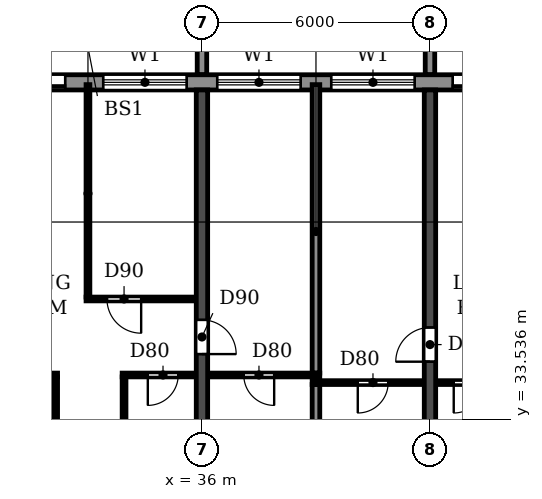
"""IFC4 building model, lengths in metres.
Left out: names, types, materials, properties, quantities, classifications, styles, units other than length and angle.
Written with IfcOpenShell. Run it as: python <this file> out.ifc"""

import sys

from ifc_helpers import new_model, si_unit, direction, frame, frame_2d, origin, place, context, subcontext, project, spatial, polyline, rectangle, outline, extrude, source, transform, mapped, element, fill, save


model = new_model("IFC4")
c1 = context("Model", 3, precision=1e-05, world=origin(), true_north=direction((0.0, 1.0)))
c2 = subcontext(c1, "Body", "Model", "MODEL_VIEW")
j1 = project(units=[si_unit("LENGTHUNIT", "METRE"), si_unit("PLANEANGLEUNIT", "RADIAN")], contexts=[c1])
p1 = place(None, origin())
s1 = spatial("IfcSite", under=j1, at=p1, CompositionType="ELEMENT")
p2 = place(p1, origin())
s2 = spatial("IfcBuilding", under=s1, at=p2, CompositionType="ELEMENT")
p3 = place(p2, frame((0.0, 0.0, 152.1)))
s3 = spatial("IfcBuildingStorey", under=s2, at=p3, CompositionType="ELEMENT", Elevation=152.1)
p4 = place(p3, frame((36.0, 30.525, 0.0), z_axis=(0.0, 0.0, 1.0), x_axis=(0.0, 1.0, 0.0)))
e1 = element("IfcWall", 1, at=p4, inside=s3, PredefinedType="SHEAR", context=c2, shape_type="SweptSolid", body=[
    extrude(rectangle(XDim=11.675, YDim=0.3, at=frame_2d((5.837, 0.0))), origin(), (0.0, 0.0, 1.0), 3.07),
])
p5 = place(p4, frame((4.725, 0.0, 0.0)))
e2 = element("IfcOpeningElement", 2, at=p5, cuts=e1, PredefinedType="OPENING", context=c2, shape_type="SweptSolid", body=[
    extrude(rectangle(XDim=0.9, YDim=2.1, at=frame_2d((0.45, 1.05))), frame((0.0, 0.16, 0.0), z_axis=(0.0, -1.0, 0.0), x_axis=(1.0, 0.0, 0.0)), (0.0, 0.0, 1.0), 0.32),
])
p6 = place(p3, frame((42.0, 30.525, 0.0), z_axis=(0.0, 0.0, 1.0), x_axis=(0.0, 1.0, 0.0)))
e3 = element("IfcWall", 3, at=p6, inside=s3, PredefinedType="SHEAR", context=c2, shape_type="SweptSolid", body=[
    extrude(rectangle(XDim=11.675, YDim=0.3, at=frame_2d((5.837, 0.0))), origin(), (0.0, 0.0, 1.0), 3.07),
])
p7 = place(p6, frame((4.525, 0.0, 0.0)))
e4 = element("IfcOpeningElement", 4, at=p7, cuts=e3, PredefinedType="OPENING", context=c2, shape_type="SweptSolid", body=[
    extrude(rectangle(XDim=0.9, YDim=2.1, at=frame_2d((0.45, 1.05))), frame((0.0, 0.16, 0.0), z_axis=(0.0, -1.0, 0.0), x_axis=(1.0, 0.0, 0.0)), (0.0, 0.0, 1.0), 0.32),
])
p8 = place(p3, frame((85.317, 42.4, 0.0), z_axis=(0.0, 0.0, 1.0), x_axis=(-1.0, 0.0, 0.0)))
e5 = element("IfcWall", 5, at=p8, inside=s3, PredefinedType="STANDARD", context=c2, shape_type="SweptSolid", body=[
    extrude(rectangle(XDim=68.634, YDim=0.4, at=frame_2d((34.317, 0.0))), origin(), (0.0, 0.0, 1.0), 3.07),
])
p9 = place(p8, frame((64.917, 0.0, 0.0)))
e6 = element("IfcOpeningElement", 6, at=p9, cuts=e5, PredefinedType="OPENING", context=c2, shape_type="SweptSolid", body=[
    extrude(rectangle(XDim=1.8, YDim=2.4, at=frame_2d((0.9, 1.2))), frame((0.0, 0.21, 0.0), z_axis=(0.0, -1.0, 0.0), x_axis=(1.0, 0.0, 0.0)), (0.0, 0.0, 1.0), 0.42),
])
p10 = place(p8, frame((61.717, 0.0, 0.9)))
e7 = element("IfcOpeningElement", 7, at=p10, cuts=e5, PredefinedType="OPENING", context=c2, shape_type="SweptSolid", body=[
    extrude(rectangle(XDim=2.2, YDim=1.5, at=frame_2d((1.1, 0.75))), frame((0.0, 0.21, 0.0), z_axis=(0.0, -1.0, 0.0), x_axis=(1.0, 0.0, 0.0)), (0.0, 0.0, 1.0), 0.42),
])
p11 = place(p8, frame((58.717, 0.0, 0.9)))
e8 = element("IfcOpeningElement", 8, at=p11, cuts=e5, PredefinedType="OPENING", context=c2, shape_type="SweptSolid", body=[
    extrude(rectangle(XDim=2.2, YDim=1.5, at=frame_2d((1.1, 0.75))), frame((0.0, 0.21, 0.0), z_axis=(0.0, -1.0, 0.0), x_axis=(1.0, 0.0, 0.0)), (0.0, 0.0, 1.0), 0.42),
])
p12 = place(p8, frame((55.917, 0.0, 0.0)))
e9 = element("IfcOpeningElement", 9, at=p12, cuts=e5, PredefinedType="OPENING", context=c2, shape_type="SweptSolid", body=[
    extrude(rectangle(XDim=1.8, YDim=2.4, at=frame_2d((0.9, 1.2))), frame((0.0, 0.21, 0.0), z_axis=(0.0, -1.0, 0.0), x_axis=(1.0, 0.0, 0.0)), (0.0, 0.0, 1.0), 0.42),
])
p13 = place(p8, frame((52.917, 0.0, 0.0)))
e10 = element("IfcOpeningElement", 10, at=p13, cuts=e5, PredefinedType="OPENING", context=c2, shape_type="SweptSolid", body=[
    extrude(rectangle(XDim=1.8, YDim=2.4, at=frame_2d((0.9, 1.2))), frame((0.0, 0.21, 0.0), z_axis=(0.0, -1.0, 0.0), x_axis=(1.0, 0.0, 0.0)), (0.0, 0.0, 1.0), 0.42),
])
p14 = place(p8, frame((49.717, 0.0, 0.9)))
e11 = element("IfcOpeningElement", 11, at=p14, cuts=e5, PredefinedType="OPENING", context=c2, shape_type="SweptSolid", body=[
    extrude(rectangle(XDim=2.2, YDim=1.5, at=frame_2d((1.1, 0.75))), frame((0.0, 0.21, 0.0), z_axis=(0.0, -1.0, 0.0), x_axis=(1.0, 0.0, 0.0)), (0.0, 0.0, 1.0), 0.42),
])
p15 = place(p8, frame((46.717, 0.0, 0.9)))
e12 = element("IfcOpeningElement", 12, at=p15, cuts=e5, PredefinedType="OPENING", context=c2, shape_type="SweptSolid", body=[
    extrude(rectangle(XDim=2.2, YDim=1.5, at=frame_2d((1.1, 0.75))), frame((0.0, 0.21, 0.0), z_axis=(0.0, -1.0, 0.0), x_axis=(1.0, 0.0, 0.0)), (0.0, 0.0, 1.0), 0.42),
])
p16 = place(p8, frame((43.717, 0.0, 0.9)))
e13 = element("IfcOpeningElement", 13, at=p16, cuts=e5, PredefinedType="OPENING", context=c2, shape_type="SweptSolid", body=[
    extrude(rectangle(XDim=2.2, YDim=1.5, at=frame_2d((1.1, 0.75))), frame((0.0, 0.21, 0.0), z_axis=(0.0, -1.0, 0.0), x_axis=(1.0, 0.0, 0.0)), (0.0, 0.0, 1.0), 0.42),
])
p17 = place(p8, frame((40.917, 0.0, 0.0)))
e14 = element("IfcOpeningElement", 14, at=p17, cuts=e5, PredefinedType="OPENING", context=c2, shape_type="SweptSolid", body=[
    extrude(rectangle(XDim=1.8, YDim=2.4, at=frame_2d((0.9, 1.2))), frame((0.0, 0.21, 0.0), z_axis=(0.0, -1.0, 0.0), x_axis=(1.0, 0.0, 0.0)), (0.0, 0.0, 1.0), 0.42),
])
p18 = place(p8, frame((37.717, 0.0, 0.9)))
e15 = element("IfcOpeningElement", 15, at=p18, cuts=e5, PredefinedType="OPENING", context=c2, shape_type="SweptSolid", body=[
    extrude(rectangle(XDim=2.2, YDim=1.5, at=frame_2d((1.1, 0.75))), frame((0.0, 0.21, 0.0), z_axis=(0.0, -1.0, 0.0), x_axis=(1.0, 0.0, 0.0)), (0.0, 0.0, 1.0), 0.42),
])
p19 = place(p8, frame((34.917, 0.0, 0.0)))
e16 = element("IfcOpeningElement", 16, at=p19, cuts=e5, PredefinedType="OPENING", context=c2, shape_type="SweptSolid", body=[
    extrude(rectangle(XDim=1.8, YDim=2.4, at=frame_2d((0.9, 1.2))), frame((0.0, 0.21, 0.0), z_axis=(0.0, -1.0, 0.0), x_axis=(1.0, 0.0, 0.0)), (0.0, 0.0, 1.0), 0.42),
])
p20 = place(p8, frame((31.717, 0.0, 0.9)))
e17 = element("IfcOpeningElement", 17, at=p20, cuts=e5, PredefinedType="OPENING", context=c2, shape_type="SweptSolid", body=[
    extrude(rectangle(XDim=2.2, YDim=1.5, at=frame_2d((1.1, 0.75))), frame((0.0, 0.21, 0.0), z_axis=(0.0, -1.0, 0.0), x_axis=(1.0, 0.0, 0.0)), (0.0, 0.0, 1.0), 0.42),
])
p21 = place(p8, frame((28.717, 0.0, 0.9)))
e18 = element("IfcOpeningElement", 18, at=p21, cuts=e5, PredefinedType="OPENING", context=c2, shape_type="SweptSolid", body=[
    extrude(rectangle(XDim=2.2, YDim=1.5, at=frame_2d((1.1, 0.75))), frame((0.0, 0.21, 0.0), z_axis=(0.0, -1.0, 0.0), x_axis=(1.0, 0.0, 0.0)), (0.0, 0.0, 1.0), 0.42),
])
p22 = place(p8, frame((25.717, 0.0, 0.9)))
e19 = element("IfcOpeningElement", 19, at=p22, cuts=e5, PredefinedType="OPENING", context=c2, shape_type="SweptSolid", body=[
    extrude(rectangle(XDim=2.2, YDim=1.5, at=frame_2d((1.1, 0.75))), frame((0.0, 0.21, 0.0), z_axis=(0.0, -1.0, 0.0), x_axis=(1.0, 0.0, 0.0)), (0.0, 0.0, 1.0), 0.42),
])
p23 = place(p8, frame((22.717, 0.0, 0.9)))
e20 = element("IfcOpeningElement", 20, at=p23, cuts=e5, PredefinedType="OPENING", context=c2, shape_type="SweptSolid", body=[
    extrude(rectangle(XDim=2.2, YDim=1.5, at=frame_2d((1.1, 0.75))), frame((0.0, 0.21, 0.0), z_axis=(0.0, -1.0, 0.0), x_axis=(1.0, 0.0, 0.0)), (0.0, 0.0, 1.0), 0.42),
])
p24 = place(p8, frame((19.917, 0.0, 0.0)))
e21 = element("IfcOpeningElement", 21, at=p24, cuts=e5, PredefinedType="OPENING", context=c2, shape_type="SweptSolid", body=[
    extrude(rectangle(XDim=1.8, YDim=2.4, at=frame_2d((0.9, 1.2))), frame((0.0, 0.21, 0.0), z_axis=(0.0, -1.0, 0.0), x_axis=(1.0, 0.0, 0.0)), (0.0, 0.0, 1.0), 0.42),
])
p25 = place(p8, frame((16.717, 0.0, 0.9)))
e22 = element("IfcOpeningElement", 22, at=p25, cuts=e5, PredefinedType="OPENING", context=c2, shape_type="SweptSolid", body=[
    extrude(rectangle(XDim=2.2, YDim=1.5, at=frame_2d((1.1, 0.75))), frame((0.0, 0.21, 0.0), z_axis=(0.0, -1.0, 0.0), x_axis=(1.0, 0.0, 0.0)), (0.0, 0.0, 1.0), 0.42),
])
p26 = place(p8, frame((13.717, 0.0, 0.9)))
e23 = element("IfcOpeningElement", 23, at=p26, cuts=e5, PredefinedType="OPENING", context=c2, shape_type="SweptSolid", body=[
    extrude(rectangle(XDim=2.2, YDim=1.5, at=frame_2d((1.1, 0.75))), frame((0.0, 0.21, 0.0), z_axis=(0.0, -1.0, 0.0), x_axis=(1.0, 0.0, 0.0)), (0.0, 0.0, 1.0), 0.42),
])
p27 = place(p8, frame((10.917, 0.0, 0.0)))
e24 = element("IfcOpeningElement", 24, at=p27, cuts=e5, PredefinedType="OPENING", context=c2, shape_type="SweptSolid", body=[
    extrude(rectangle(XDim=1.8, YDim=2.4, at=frame_2d((0.9, 1.2))), frame((0.0, 0.21, 0.0), z_axis=(0.0, -1.0, 0.0), x_axis=(1.0, 0.0, 0.0)), (0.0, 0.0, 1.0), 0.42),
])
p28 = place(p8, frame((7.717, 0.0, 0.9)))
e25 = element("IfcOpeningElement", 25, at=p28, cuts=e5, PredefinedType="OPENING", context=c2, shape_type="SweptSolid", body=[
    extrude(rectangle(XDim=2.2, YDim=1.5, at=frame_2d((1.1, 0.75))), frame((0.0, 0.21, 0.0), z_axis=(0.0, -1.0, 0.0), x_axis=(1.0, 0.0, 0.0)), (0.0, 0.0, 1.0), 0.42),
])
p29 = place(p8, frame((4.717, 0.0, 0.9)))
e26 = element("IfcOpeningElement", 26, at=p29, cuts=e5, PredefinedType="OPENING", context=c2, shape_type="SweptSolid", body=[
    extrude(rectangle(XDim=2.2, YDim=1.5, at=frame_2d((1.1, 0.75))), frame((0.0, 0.21, 0.0), z_axis=(0.0, -1.0, 0.0), x_axis=(1.0, 0.0, 0.0)), (0.0, 0.0, 1.0), 0.42),
])
p30 = place(p8, frame((1.917, 0.0, 0.0)))
e27 = element("IfcOpeningElement", 27, at=p30, cuts=e5, PredefinedType="OPENING", context=c2, shape_type="SweptSolid", body=[
    extrude(rectangle(XDim=1.8, YDim=2.4, at=frame_2d((0.9, 1.2))), frame((0.0, 0.21, 0.0), z_axis=(0.0, -1.0, 0.0), x_axis=(1.0, 0.0, 0.0)), (0.0, 0.0, 1.0), 0.42),
])
m1 = source(origin(), c2, "Body", "SweptSolid", [
    extrude(outline(polyline([(0.0, 0.0), (0.25, 0.0), (0.25, 3.1), (0.0, 3.1), (0.0, 0.0)])), origin(), (0.0, 0.0, 1.0), 3.1),
])
for number, where in (
    (28, (35.875, 42.6, 0.0)),
    (29, (41.875, 42.6, 0.0)),
):
    element("IfcWall", number, at=place(p3, frame(where)), inside=s3, PredefinedType="STANDARD", context=c2, shape_type="MappedRepresentation", body=[
        mapped(m1, transform((0.0, 0.0, 0.0))),
    ])
p31 = place(p3, frame((39.0, 30.535, 0.0), z_axis=(0.0, 0.0, 1.0), x_axis=(0.0, 1.0, 0.0)))
e30 = element("IfcWall", 30, at=p31, inside=s3, PredefinedType="PARTITIONING", context=c2, shape_type="SweptSolid", body=[
    extrude(rectangle(XDim=3.915, YDim=0.2, at=frame_2d((1.958, 0.0))), origin(), (0.0, 0.0, 1.0), 3.07),
])
p32 = place(p3, frame((39.0, 34.75, 0.0), z_axis=(0.0, 0.0, 1.0), x_axis=(0.0, 1.0, 0.0)))
e31 = element("IfcWall", 31, at=p32, inside=s3, PredefinedType="PARTITIONING", context=c2, shape_type="SweptSolid", body=[
    extrude(rectangle(XDim=7.59, YDim=0.2, at=frame_2d((3.795, 0.0))), origin(), (0.0, 0.0, 1.0), 3.07),
])
p33 = place(p3, frame((38.9, 34.5, 0.0), z_axis=(0.0, 0.0, 1.0), x_axis=(1.0, 0.0, 0.0)))
e32 = element("IfcWall", 32, at=p33, inside=s3, PredefinedType="PARTITIONING", context=c2, shape_type="SweptSolid", body=[
    extrude(rectangle(XDim=2.94, YDim=0.1, at=frame_2d((1.47, 0.0))), origin(), (0.0, 0.0, 1.0), 3.07),
])
p34 = place(p33, frame((1.2, 0.0, 0.0)))
e33 = element("IfcOpeningElement", 33, at=p34, cuts=e32, PredefinedType="OPENING", context=c2, shape_type="SweptSolid", body=[
    extrude(rectangle(XDim=0.8, YDim=2.1, at=frame_2d((0.4, 1.05))), frame((0.0, 0.06, 0.0), z_axis=(0.0, -1.0, 0.0), x_axis=(1.0, 0.0, 0.0)), (0.0, 0.0, 1.0), 0.12),
])
p35 = place(p3, frame((42.16, 34.5, 0.0), z_axis=(0.0, 0.0, 1.0), x_axis=(1.0, 0.0, 0.0)))
e34 = element("IfcWall", 34, at=p35, inside=s3, PredefinedType="PARTITIONING", context=c2, shape_type="SweptSolid", body=[
    extrude(rectangle(XDim=1.94, YDim=0.1, at=frame_2d((0.97, 0.0))), origin(), (0.0, 0.0, 1.0), 3.07),
])
p36 = place(p35, frame((0.465, 0.0, 0.0)))
e35 = element("IfcOpeningElement", 35, at=p36, cuts=e34, PredefinedType="OPENING", context=c2, shape_type="SweptSolid", body=[
    extrude(rectangle(XDim=0.8, YDim=2.1, at=frame_2d((0.4, 1.05))), frame((0.0, 0.06, 0.0), z_axis=(0.0, -1.0, 0.0), x_axis=(1.0, 0.0, 0.0)), (0.0, 0.0, 1.0), 0.12),
])
p37 = place(p3, frame((30.16, 34.7, 0.0), z_axis=(0.0, 0.0, 1.0), x_axis=(1.0, 0.0, 0.0)))
e36 = element("IfcWall", 36, at=p37, inside=s3, PredefinedType="PARTITIONING", context=c2, shape_type="SweptSolid", body=[
    extrude(rectangle(XDim=2.04, YDim=0.1, at=frame_2d((1.02, 0.0))), origin(), (0.0, 0.0, 1.0), 3.07),
])
p38 = place(p37, frame((0.465, 0.0, 0.0)))
e37 = element("IfcOpeningElement", 37, at=p38, cuts=e36, PredefinedType="OPENING", context=c2, shape_type="SweptSolid", body=[
    extrude(rectangle(XDim=0.9, YDim=2.1, at=frame_2d((0.45, 1.05))), frame((0.0, 0.06, 0.0), z_axis=(0.0, -1.0, 0.0), x_axis=(1.0, 0.0, 0.0)), (0.0, 0.0, 1.0), 0.12),
])
p39 = place(p3, frame((33.9, 34.7, 0.0), z_axis=(0.0, 0.0, 1.0), x_axis=(1.0, 0.0, 0.0)))
e38 = element("IfcWall", 38, at=p39, inside=s3, PredefinedType="PARTITIONING", context=c2, shape_type="SweptSolid", body=[
    extrude(rectangle(XDim=1.94, YDim=0.1, at=frame_2d((0.97, 0.0))), origin(), (0.0, 0.0, 1.0), 3.07),
])
p40 = place(p39, frame((0.675, 0.0, 0.0)))
e39 = element("IfcOpeningElement", 39, at=p40, cuts=e38, PredefinedType="OPENING", context=c2, shape_type="SweptSolid", body=[
    extrude(rectangle(XDim=0.8, YDim=2.1, at=frame_2d((0.4, 1.05))), frame((0.0, 0.06, 0.0), z_axis=(0.0, -1.0, 0.0), x_axis=(1.0, 0.0, 0.0)), (0.0, 0.0, 1.0), 0.12),
])
p41 = place(p3, frame((36.16, 34.7, 0.0), z_axis=(0.0, 0.0, 1.0), x_axis=(1.0, 0.0, 0.0)))
e40 = element("IfcWall", 40, at=p41, inside=s3, PredefinedType="PARTITIONING", context=c2, shape_type="SweptSolid", body=[
    extrude(rectangle(XDim=2.94, YDim=0.1, at=frame_2d((1.47, 0.0))), origin(), (0.0, 0.0, 1.0), 3.07),
])
p42 = place(p41, frame((0.94, 0.0, 0.0)))
e41 = element("IfcOpeningElement", 41, at=p42, cuts=e40, PredefinedType="OPENING", context=c2, shape_type="SweptSolid", body=[
    extrude(rectangle(XDim=0.8, YDim=2.1, at=frame_2d((0.4, 1.05))), frame((0.0, 0.06, 0.0), z_axis=(0.0, -1.0, 0.0), x_axis=(1.0, 0.0, 0.0)), (0.0, 0.0, 1.0), 0.12),
])
p43 = place(p3, frame((32.95, 36.7, 0.0), z_axis=(0.0, 0.0, 1.0), x_axis=(1.0, 0.0, 0.0)))
e42 = element("IfcWall", 42, at=p43, inside=s3, PredefinedType="PARTITIONING", context=c2, shape_type="SweptSolid", body=[
    extrude(rectangle(XDim=2.89, YDim=0.1, at=frame_2d((1.445, 0.0))), origin(), (0.0, 0.0, 1.0), 3.07),
])
p44 = place(p43, frame((0.55, 0.0, 0.0)))
e43 = element("IfcOpeningElement", 43, at=p44, cuts=e42, PredefinedType="OPENING", context=c2, shape_type="SweptSolid", body=[
    extrude(rectangle(XDim=0.9, YDim=2.1, at=frame_2d((0.45, 1.05))), frame((0.0, 0.06, 0.0), z_axis=(0.0, -1.0, 0.0), x_axis=(1.0, 0.0, 0.0)), (0.0, 0.0, 1.0), 0.12),
])
p45 = place(p3, frame((32.15, 30.535, 0.0), z_axis=(0.0, 0.0, 1.0), x_axis=(0.0, 1.0, 0.0)))
e44 = element("IfcWall", 44, at=p45, inside=s3, PredefinedType="PARTITIONING", context=c2, shape_type="SweptSolid", body=[
    extrude(rectangle(XDim=4.115, YDim=0.1, at=frame_2d((2.058, 0.0))), origin(), (0.0, 0.0, 1.0), 3.07),
])
p46 = place(p3, frame((33.0, 36.75, 0.0), z_axis=(0.0, 0.0, 1.0), x_axis=(0.0, 1.0, 0.0)))
e45 = element("IfcWall", 45, at=p46, inside=s3, PredefinedType="PARTITIONING", context=c2, shape_type="SweptSolid", body=[
    extrude(rectangle(XDim=5.59, YDim=0.1, at=frame_2d((2.795, 0.0))), origin(), (0.0, 0.0, 1.0), 3.07),
])
p47 = place(p3, frame((33.95, 30.535, 0.0), z_axis=(0.0, 0.0, 1.0), x_axis=(0.0, 1.0, 0.0)))
e46 = element("IfcWall", 46, at=p47, inside=s3, PredefinedType="PARTITIONING", context=c2, shape_type="SweptSolid", body=[
    extrude(rectangle(XDim=4.115, YDim=0.1, at=frame_2d((2.058, 0.0))), origin(), (0.0, 0.0, 1.0), 3.07),
])
p48 = place(p13, origin())
e47 = element("IfcDoor", 47, at=p48, inside=s3, OperationType="DOUBLE_DOOR_SLIDING", PredefinedType="DOOR", context=c2, shape_type="SweptSolid", body=[
    extrude(rectangle(XDim=1.8, YDim=2.4, at=frame_2d((0.9, 1.2))), frame((0.0, 0.025, 0.0), z_axis=(0.0, -1.0, 0.0), x_axis=(1.0, 0.0, 0.0)), (0.0, 0.0, 1.0), 0.05),
])
fill(e10, e47)
p49 = place(p14, origin())
e48 = element("IfcWindow", 48, at=p49, inside=s3, PartitioningType="DOUBLE_PANEL_HORIZONTAL", PredefinedType="WINDOW", context=c2, shape_type="SweptSolid", body=[
    extrude(rectangle(XDim=2.2, YDim=1.5, at=frame_2d((1.1, 0.75))), frame((0.0, 0.03, 0.0), z_axis=(0.0, -1.0, 0.0), x_axis=(1.0, 0.0, 0.0)), (0.0, 0.0, 1.0), 0.06),
])
fill(e11, e48)
p50 = place(p15, origin())
e49 = element("IfcWindow", 49, at=p50, inside=s3, PartitioningType="DOUBLE_PANEL_HORIZONTAL", PredefinedType="WINDOW", context=c2, shape_type="SweptSolid", body=[
    extrude(rectangle(XDim=2.2, YDim=1.5, at=frame_2d((1.1, 0.75))), frame((0.0, 0.03, 0.0), z_axis=(0.0, -1.0, 0.0), x_axis=(1.0, 0.0, 0.0)), (0.0, 0.0, 1.0), 0.06),
])
fill(e12, e49)
p51 = place(p16, origin())
e50 = element("IfcWindow", 50, at=p51, inside=s3, PartitioningType="DOUBLE_PANEL_HORIZONTAL", PredefinedType="WINDOW", context=c2, shape_type="SweptSolid", body=[
    extrude(rectangle(XDim=2.2, YDim=1.5, at=frame_2d((1.1, 0.75))), frame((0.0, 0.03, 0.0), z_axis=(0.0, -1.0, 0.0), x_axis=(1.0, 0.0, 0.0)), (0.0, 0.0, 1.0), 0.06),
])
fill(e13, e50)
p52 = place(p17, origin())
e51 = element("IfcDoor", 51, at=p52, inside=s3, OperationType="DOUBLE_DOOR_SLIDING", PredefinedType="DOOR", context=c2, shape_type="SweptSolid", body=[
    extrude(rectangle(XDim=1.8, YDim=2.4, at=frame_2d((0.9, 1.2))), frame((0.0, 0.025, 0.0), z_axis=(0.0, -1.0, 0.0), x_axis=(1.0, 0.0, 0.0)), (0.0, 0.0, 1.0), 0.05),
])
fill(e14, e51)
p53 = place(p42, frame((0.8, 0.0, 0.0), z_axis=(0.0, 0.0, 1.0), x_axis=(-1.0, 0.0, 0.0)))
e52 = element("IfcDoor", 52, at=p53, inside=s3, OperationType="SINGLE_SWING_LEFT", PredefinedType="DOOR", context=c2, shape_type="SweptSolid", body=[
    extrude(rectangle(XDim=0.8, YDim=2.1, at=frame_2d((0.4, 1.05))), frame((0.0, 0.025, 0.0), z_axis=(0.0, -1.0, 0.0), x_axis=(1.0, 0.0, 0.0)), (0.0, 0.0, 1.0), 0.05),
])
fill(e41, e52)
p54 = place(p44, frame((0.9, 0.0, 0.0), z_axis=(0.0, 0.0, 1.0), x_axis=(-1.0, 0.0, 0.0)))
e53 = element("IfcDoor", 53, at=p54, inside=s3, OperationType="SINGLE_SWING_LEFT", PredefinedType="DOOR", context=c2, shape_type="SweptSolid", body=[
    extrude(rectangle(XDim=0.9, YDim=2.1, at=frame_2d((0.45, 1.05))), frame((0.0, 0.025, 0.0), z_axis=(0.0, -1.0, 0.0), x_axis=(1.0, 0.0, 0.0)), (0.0, 0.0, 1.0), 0.05),
])
fill(e43, e53)
p55 = place(p40, frame((0.8, 0.0, 0.0), z_axis=(0.0, 0.0, 1.0), x_axis=(-1.0, 0.0, 0.0)))
e54 = element("IfcDoor", 54, at=p55, inside=s3, OperationType="SINGLE_SWING_RIGHT", PredefinedType="DOOR", context=c2, shape_type="SweptSolid", body=[
    extrude(rectangle(XDim=0.8, YDim=2.1, at=frame_2d((0.4, 1.05))), frame((0.0, 0.025, 0.0), z_axis=(0.0, -1.0, 0.0), x_axis=(1.0, 0.0, 0.0)), (0.0, 0.0, 1.0), 0.05),
])
fill(e39, e54)
p56 = place(p5, frame((0.9, 0.0, 0.0), z_axis=(0.0, 0.0, 1.0), x_axis=(-1.0, 0.0, 0.0)))
e55 = element("IfcDoor", 55, at=p56, inside=s3, OperationType="SINGLE_SWING_RIGHT", PredefinedType="DOOR", context=c2, shape_type="SweptSolid", body=[
    extrude(rectangle(XDim=0.9, YDim=2.1, at=frame_2d((0.45, 1.05))), frame((0.0, 0.025, 0.0), z_axis=(0.0, -1.0, 0.0), x_axis=(1.0, 0.0, 0.0)), (0.0, 0.0, 1.0), 0.05),
])
fill(e2, e55)
p57 = place(p34, frame((0.8, 0.0, 0.0), z_axis=(0.0, 0.0, 1.0), x_axis=(-1.0, 0.0, 0.0)))
e56 = element("IfcDoor", 56, at=p57, inside=s3, OperationType="SINGLE_SWING_RIGHT", PredefinedType="DOOR", context=c2, shape_type="SweptSolid", body=[
    extrude(rectangle(XDim=0.8, YDim=2.1, at=frame_2d((0.4, 1.05))), frame((0.0, 0.025, 0.0), z_axis=(0.0, -1.0, 0.0), x_axis=(1.0, 0.0, 0.0)), (0.0, 0.0, 1.0), 0.05),
])
fill(e33, e56)
p58 = place(p7, origin())
e57 = element("IfcDoor", 57, at=p58, inside=s3, OperationType="SINGLE_SWING_LEFT", PredefinedType="DOOR", context=c2, shape_type="SweptSolid", body=[
    extrude(rectangle(XDim=0.9, YDim=2.1, at=frame_2d((0.45, 1.05))), frame((0.0, 0.025, 0.0), z_axis=(0.0, -1.0, 0.0), x_axis=(1.0, 0.0, 0.0)), (0.0, 0.0, 1.0), 0.05),
])
fill(e4, e57)
p59 = place(p36, frame((0.8, 0.0, 0.0), z_axis=(0.0, 0.0, 1.0), x_axis=(-1.0, 0.0, 0.0)))
e58 = element("IfcDoor", 58, at=p59, inside=s3, OperationType="SINGLE_SWING_RIGHT", PredefinedType="DOOR", context=c2, shape_type="SweptSolid", body=[
    extrude(rectangle(XDim=0.8, YDim=2.1, at=frame_2d((0.4, 1.05))), frame((0.0, 0.025, 0.0), z_axis=(0.0, -1.0, 0.0), x_axis=(1.0, 0.0, 0.0)), (0.0, 0.0, 1.0), 0.05),
])
fill(e35, e58)
save(model, sys.argv[1])
